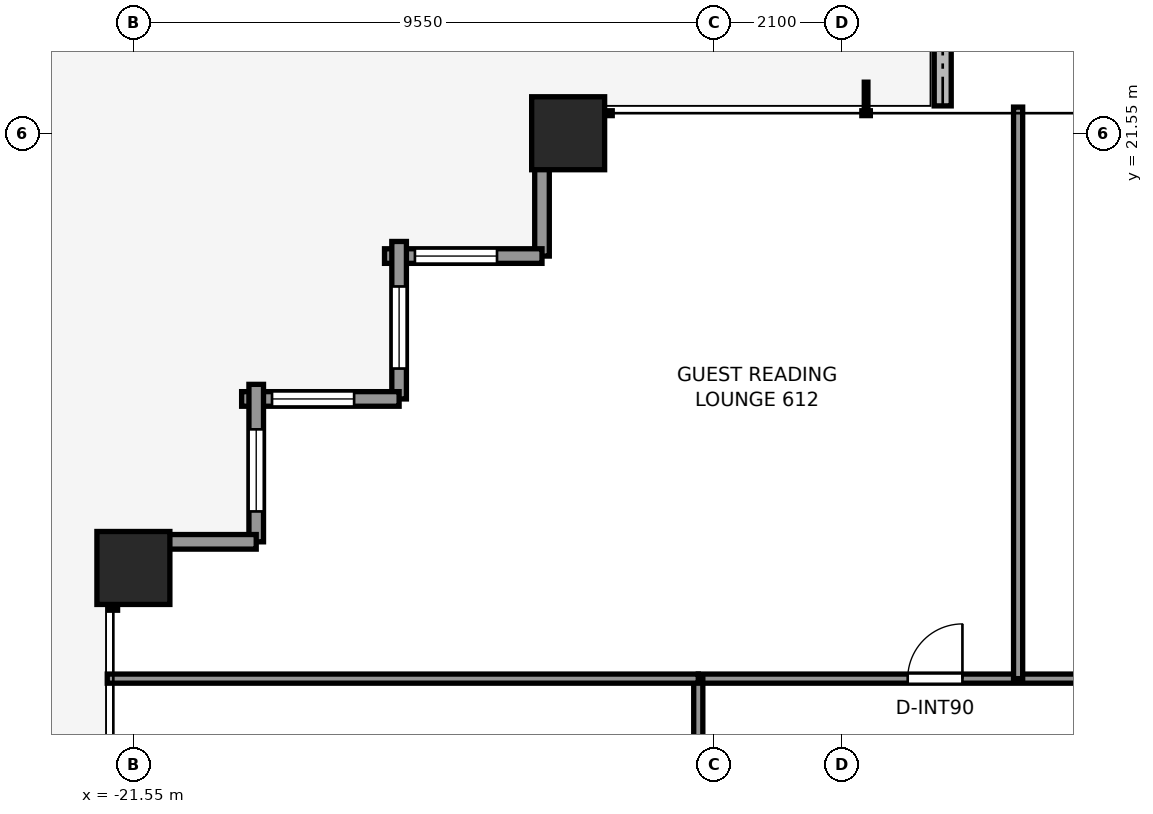
"""IFC4 building model, lengths in metres.
Left out: names, types, materials, properties, quantities, classifications, styles, units other than length and angle.
Written with IfcOpenShell. Run it as: python <this file> out.ifc"""

import sys

from ifc_helpers import new_model, si_unit, direction, frame, frame_2d, origin, origin_2d, place, context, subcontext, project, spatial, rectangle, extrude, element, fill, save


model = new_model("IFC4")
c1 = context("Model", 3, precision=1e-05, world=origin(), true_north=direction((0.0, 1.0)))
c2 = subcontext(c1, "Body", "Model", "MODEL_VIEW")
j1 = project(units=[si_unit("LENGTHUNIT", "METRE"), si_unit("PLANEANGLEUNIT", "RADIAN")], contexts=[c1])
p1 = place(None, origin())
s1 = spatial("IfcSite", under=j1, at=p1, CompositionType="ELEMENT")
p2 = place(p1, origin())
s2 = spatial("IfcBuilding", under=s1, at=p2, CompositionType="ELEMENT")
p3 = place(p2, frame((0.0, 0.0, 23.8)))
s3 = spatial("IfcBuildingStorey", under=s2, at=p3, CompositionType="ELEMENT", Elevation=23.8)
for number, where, z_axis, x_axis in (
    (1, (-14.4, 21.55, 0.0), (0.0, 0.0, 1.0), (1.0, 0.0, 0.0)),
    (2, (-21.55, 14.4, 0.0), (0.0, 0.0, 1.0), (1.0, 0.0, 0.0)),
):
    element("IfcColumn", number, at=place(p3, frame(where, z_axis=z_axis, x_axis=x_axis)), inside=s3, PredefinedType="COLUMN", context=c2, shape_type="SweptSolid", body=[
        extrude(rectangle(XDim=1.2, YDim=1.2, at=origin_2d()), origin(), (0.0, 0.0, 1.0), 3.3),
    ])
p4 = place(p3, frame((-8.24, 25.367, -0.06), z_axis=(0.0, 0.0, 1.0), x_axis=(0.0, -1.0, 0.0)))
e3 = element("IfcWall", 3, at=p4, inside=s3, PredefinedType="PARAPET", context=c2, shape_type="SweptSolid", body=[
    extrude(rectangle(XDim=3.367, YDim=0.28, at=frame_2d((1.684, 0.0))), origin(), (0.0, 0.0, 1.0), 0.42),
])
p5 = place(p3, frame((-14.83, 19.53, 0.0), z_axis=(0.0, 0.0, 1.0), x_axis=(0.0, 1.0, 0.0)))
e4 = element("IfcWall", 4, at=p5, inside=s3, PredefinedType="STANDARD", context=c2, shape_type="SweptSolid", body=[
    extrude(rectangle(XDim=2.59, YDim=0.24, at=frame_2d((1.295, 0.0))), origin(), (0.0, 0.0, 1.0), 2.439),
])
p6 = place(p3, frame((-17.42, 19.53, 0.0), z_axis=(0.0, 0.0, 1.0), x_axis=(1.0, 0.0, 0.0)))
e5 = element("IfcWall", 5, at=p6, inside=s3, PredefinedType="STANDARD", context=c2, shape_type="SweptSolid", body=[
    extrude(rectangle(XDim=2.59, YDim=0.24, at=frame_2d((1.295, 0.0))), origin(), (0.0, 0.0, 1.0), 2.439),
])
p7 = place(p6, frame((0.5, 0.0, 0.65)))
e6 = element("IfcOpeningElement", 6, at=p7, cuts=e5, PredefinedType="OPENING", context=c2, shape_type="SweptSolid", body=[
    extrude(rectangle(XDim=1.35, YDim=1.55, at=frame_2d((0.675, 0.775))), frame((0.0, 0.13, 0.0), z_axis=(0.0, -1.0, 0.0), x_axis=(1.0, 0.0, 0.0)), (0.0, 0.0, 1.0), 0.26),
])
p8 = place(p3, frame((-17.18, 17.18, 0.0), z_axis=(0.0, 0.0, 1.0), x_axis=(0.0, 1.0, 0.0)))
e7 = element("IfcWall", 7, at=p8, inside=s3, PredefinedType="STANDARD", context=c2, shape_type="SweptSolid", body=[
    extrude(rectangle(XDim=2.59, YDim=0.24, at=frame_2d((1.295, 0.0))), origin(), (0.0, 0.0, 1.0), 2.439),
])
p9 = place(p8, frame((0.5, 0.0, 0.65)))
e8 = element("IfcOpeningElement", 8, at=p9, cuts=e7, PredefinedType="OPENING", context=c2, shape_type="SweptSolid", body=[
    extrude(rectangle(XDim=1.35, YDim=1.55, at=frame_2d((0.675, 0.775))), frame((0.0, 0.13, 0.0), z_axis=(0.0, -1.0, 0.0), x_axis=(1.0, 0.0, 0.0)), (0.0, 0.0, 1.0), 0.26),
])
p10 = place(p3, frame((-19.77, 17.18, 0.0), z_axis=(0.0, 0.0, 1.0), x_axis=(1.0, 0.0, 0.0)))
e9 = element("IfcWall", 9, at=p10, inside=s3, PredefinedType="STANDARD", context=c2, shape_type="SweptSolid", body=[
    extrude(rectangle(XDim=2.59, YDim=0.24, at=frame_2d((1.295, 0.0))), origin(), (0.0, 0.0, 1.0), 2.439),
])
p11 = place(p10, frame((0.5, 0.0, 0.65)))
e10 = element("IfcOpeningElement", 10, at=p11, cuts=e9, PredefinedType="OPENING", context=c2, shape_type="SweptSolid", body=[
    extrude(rectangle(XDim=1.35, YDim=1.55, at=frame_2d((0.675, 0.775))), frame((0.0, 0.13, 0.0), z_axis=(0.0, -1.0, 0.0), x_axis=(1.0, 0.0, 0.0)), (0.0, 0.0, 1.0), 0.26),
])
p12 = place(p3, frame((-19.53, 14.83, 0.0), z_axis=(0.0, 0.0, 1.0), x_axis=(0.0, 1.0, 0.0)))
e11 = element("IfcWall", 11, at=p12, inside=s3, PredefinedType="STANDARD", context=c2, shape_type="SweptSolid", body=[
    extrude(rectangle(XDim=2.59, YDim=0.24, at=frame_2d((1.295, 0.0))), origin(), (0.0, 0.0, 1.0), 2.439),
])
p13 = place(p12, frame((0.5, 0.0, 0.65)))
e12 = element("IfcOpeningElement", 12, at=p13, cuts=e11, PredefinedType="OPENING", context=c2, shape_type="SweptSolid", body=[
    extrude(rectangle(XDim=1.35, YDim=1.55, at=frame_2d((0.675, 0.775))), frame((0.0, 0.13, 0.0), z_axis=(0.0, -1.0, 0.0), x_axis=(1.0, 0.0, 0.0)), (0.0, 0.0, 1.0), 0.26),
])
p14 = place(p3, frame((-22.12, 14.83, 0.0), z_axis=(0.0, 0.0, 1.0), x_axis=(1.0, 0.0, 0.0)))
e13 = element("IfcWall", 13, at=p14, inside=s3, PredefinedType="STANDARD", context=c2, shape_type="SweptSolid", body=[
    extrude(rectangle(XDim=2.59, YDim=0.24, at=frame_2d((1.295, 0.0))), origin(), (0.0, 0.0, 1.0), 2.439),
])
p15 = place(p3, frame((-12.26, 12.58, 0.0), z_axis=(0.0, 0.0, 1.0), x_axis=(1.0, 0.0, 0.0)))
e14 = element("IfcWall", 14, at=p15, inside=s3, PredefinedType="PARTITIONING", context=c2, shape_type="SweptSolid", body=[
    extrude(rectangle(XDim=24.68, YDim=0.15, at=frame_2d((12.34, 0.0))), origin(), (0.0, 0.0, 1.0), 2.272),
])
p16 = place(p15, frame((3.444, 0.0, 0.0)))
e15 = element("IfcOpeningElement", 15, at=p16, cuts=e14, PredefinedType="OPENING", context=c2, shape_type="SweptSolid", body=[
    extrude(rectangle(XDim=0.9, YDim=2.06, at=frame_2d((0.45, 1.03))), frame((0.0, 0.085, 0.0), z_axis=(0.0, -1.0, 0.0), x_axis=(1.0, 0.0, 0.0)), (0.0, 0.0, 1.0), 0.17),
])
p17 = place(p15, frame((9.78, 0.0, 0.0)))
e16 = element("IfcOpeningElement", 16, at=p17, cuts=e14, PredefinedType="OPENING", context=c2, shape_type="SweptSolid", body=[
    extrude(rectangle(XDim=0.9, YDim=2.06, at=frame_2d((0.45, 1.03))), frame((0.0, 0.085, 0.0), z_axis=(0.0, -1.0, 0.0), x_axis=(1.0, 0.0, 0.0)), (0.0, 0.0, 1.0), 0.17),
])
p18 = place(p15, frame((19.345, 0.0, 0.0)))
e17 = element("IfcOpeningElement", 17, at=p18, cuts=e14, PredefinedType="OPENING", context=c2, shape_type="SweptSolid", body=[
    extrude(rectangle(XDim=0.9, YDim=2.06, at=frame_2d((0.45, 1.03))), frame((0.0, 0.085, 0.0), z_axis=(0.0, -1.0, 0.0), x_axis=(1.0, 0.0, 0.0)), (0.0, 0.0, 1.0), 0.17),
])
p19 = place(p3, frame((-12.26, -12.26, 0.0), z_axis=(0.0, 0.0, 1.0), x_axis=(0.0, 1.0, 0.0)))
e18 = element("IfcWall", 18, at=p19, inside=s3, PredefinedType="PARTITIONING", context=c2, shape_type="SweptSolid", body=[
    extrude(rectangle(XDim=24.84, YDim=0.15, at=frame_2d((12.42, 0.0))), origin(), (0.0, 0.0, 1.0), 2.272),
])
p20 = place(p19, frame((4.395, 0.0, 0.0)))
e19 = element("IfcOpeningElement", 19, at=p20, cuts=e18, PredefinedType="OPENING", context=c2, shape_type="SweptSolid", body=[
    extrude(rectangle(XDim=0.95, YDim=2.06, at=frame_2d((0.475, 1.03))), frame((0.0, 0.085, 0.0), z_axis=(0.0, -1.0, 0.0), x_axis=(1.0, 0.0, 0.0)), (0.0, 0.0, 1.0), 0.17),
])
p21 = place(p19, frame((13.815, 0.0, 0.0)))
e20 = element("IfcOpeningElement", 20, at=p21, cuts=e18, PredefinedType="OPENING", context=c2, shape_type="SweptSolid", body=[
    extrude(rectangle(XDim=0.95, YDim=2.06, at=frame_2d((0.475, 1.03))), frame((0.0, 0.085, 0.0), z_axis=(0.0, -1.0, 0.0), x_axis=(1.0, 0.0, 0.0)), (0.0, 0.0, 1.0), 0.17),
])
p22 = place(p19, frame((20.268, 0.0, 0.0)))
e21 = element("IfcOpeningElement", 21, at=p22, cuts=e18, PredefinedType="OPENING", context=c2, shape_type="SweptSolid", body=[
    extrude(rectangle(XDim=0.95, YDim=2.06, at=frame_2d((0.475, 1.03))), frame((0.0, 0.085, 0.0), z_axis=(0.0, -1.0, 0.0), x_axis=(1.0, 0.0, 0.0)), (0.0, 0.0, 1.0), 0.17),
])
p23 = place(p3, frame((-21.98, 12.58, 0.0), z_axis=(0.0, 0.0, 1.0), x_axis=(1.0, 0.0, 0.0)))
e22 = element("IfcWall", 22, at=p23, inside=s3, PredefinedType="PARTITIONING", context=c2, shape_type="SweptSolid", body=[
    extrude(rectangle(XDim=9.72, YDim=0.15, at=frame_2d((4.86, 0.0))), origin(), (0.0, 0.0, 1.0), 2.272),
])
p24 = place(p3, frame((-7.0, 12.58, 0.0), z_axis=(0.0, 0.0, 1.0), x_axis=(0.0, 1.0, 0.0)))
e23 = element("IfcWall", 23, at=p24, inside=s3, PredefinedType="PARTITIONING", context=c2, shape_type="SweptSolid", body=[
    extrude(rectangle(XDim=9.4, YDim=0.15, at=frame_2d((4.7, 0.0))), origin(), (0.0, 0.0, 1.0), 2.429),
])
p25 = place(p7, origin())
e24 = element("IfcWindow", 24, at=p25, inside=s3, PartitioningType="SINGLE_PANEL", PredefinedType="WINDOW", context=c2, shape_type="SweptSolid", body=[
    extrude(rectangle(XDim=1.35, YDim=1.55, at=frame_2d((0.675, 0.775))), frame((0.0, 0.03, 0.0), z_axis=(0.0, -1.0, 0.0), x_axis=(1.0, 0.0, 0.0)), (0.0, 0.0, 1.0), 0.06),
])
fill(e6, e24)
p26 = place(p9, origin())
e25 = element("IfcWindow", 25, at=p26, inside=s3, PartitioningType="SINGLE_PANEL", PredefinedType="WINDOW", context=c2, shape_type="SweptSolid", body=[
    extrude(rectangle(XDim=1.35, YDim=1.55, at=frame_2d((0.675, 0.775))), frame((0.0, 0.03, 0.0), z_axis=(0.0, -1.0, 0.0), x_axis=(1.0, 0.0, 0.0)), (0.0, 0.0, 1.0), 0.06),
])
fill(e8, e25)
p27 = place(p11, origin())
e26 = element("IfcWindow", 26, at=p27, inside=s3, PartitioningType="SINGLE_PANEL", PredefinedType="WINDOW", context=c2, shape_type="SweptSolid", body=[
    extrude(rectangle(XDim=1.35, YDim=1.55, at=frame_2d((0.675, 0.775))), frame((0.0, 0.03, 0.0), z_axis=(0.0, -1.0, 0.0), x_axis=(1.0, 0.0, 0.0)), (0.0, 0.0, 1.0), 0.06),
])
fill(e10, e26)
p28 = place(p13, origin())
e27 = element("IfcWindow", 27, at=p28, inside=s3, PartitioningType="SINGLE_PANEL", PredefinedType="WINDOW", context=c2, shape_type="SweptSolid", body=[
    extrude(rectangle(XDim=1.35, YDim=1.55, at=frame_2d((0.675, 0.775))), frame((0.0, 0.03, 0.0), z_axis=(0.0, -1.0, 0.0), x_axis=(1.0, 0.0, 0.0)), (0.0, 0.0, 1.0), 0.06),
])
fill(e12, e27)
p29 = place(p16, origin())
e28 = element("IfcDoor", 28, at=p29, inside=s3, OperationType="SINGLE_SWING_RIGHT", PredefinedType="DOOR", context=c2, shape_type="SweptSolid", body=[
    extrude(rectangle(XDim=0.9, YDim=2.06, at=frame_2d((0.45, 1.03))), frame((0.0, 0.025, 0.0), z_axis=(0.0, -1.0, 0.0), x_axis=(1.0, 0.0, 0.0)), (0.0, 0.0, 1.0), 0.05),
])
fill(e15, e28)
save(model, sys.argv[1])
